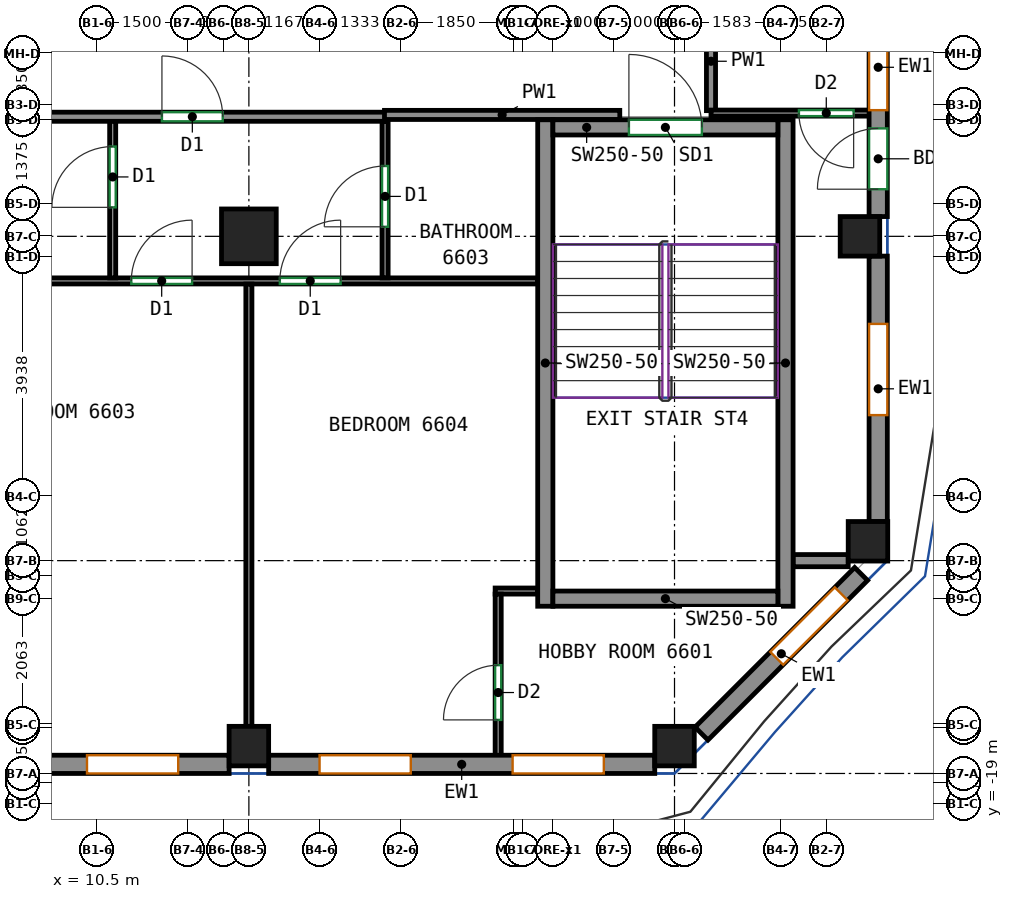
"""IFC4 building model, lengths in metres.
Left out: names, types, materials, properties, quantities, classifications, styles, units other than length and angle.
Written with IfcOpenShell. Run it as: python <this file> out.ifc"""

import sys

from ifc_helpers import new_model, si_unit, direction, frame, frame_2d, origin, origin_2d, place, context, subcontext, project, spatial, rectangle, extrude, source, transform, mapped, element, fill, save


model = new_model("IFC4")
c1 = context("Model", 3, precision=1e-05, world=origin(), true_north=direction((0.0, 1.0)))
c2 = subcontext(c1, "Body", "Model", "MODEL_VIEW")
j1 = project(units=[si_unit("LENGTHUNIT", "METRE"), si_unit("PLANEANGLEUNIT", "RADIAN")], contexts=[c1])
p1 = place(None, origin())
s1 = spatial("IfcSite", under=j1, at=p1, CompositionType="ELEMENT")
p2 = place(p1, origin())
s2 = spatial("IfcBuilding", under=s1, at=p2, CompositionType="ELEMENT")
p3 = place(p2, frame((0.0, 0.0, 270.4)))
s3 = spatial("IfcBuildingStorey", under=s2, at=p3, CompositionType="ELEMENT", Elevation=270.4)
m1 = source(origin(), c2, "Body", "SweptSolid", [
    extrude(rectangle(XDim=0.65, YDim=0.65, at=origin_2d()), origin(), (0.0, 0.0, 1.0), 3.12),
])
p4 = place(p3, frame((13.0, -18.05, 0.0), z_axis=(0.0, 0.0, 1.0), x_axis=(1.0, 0.0, 0.0)))
e1 = element("IfcColumn", 1, at=p4, inside=s3, PredefinedType="COLUMN", context=c2, shape_type="MappedRepresentation", body=[
    mapped(m1, transform((0.0, 0.0, 0.0))),
])
m2 = source(origin(), c2, "Body", "SweptSolid", [
    extrude(rectangle(XDim=0.9, YDim=0.9, at=origin_2d()), origin(), (0.0, 0.0, 1.0), 3.12),
])
p5 = place(p3, frame((13.0, -9.667, 0.0), z_axis=(0.0, 0.0, 1.0), x_axis=(1.0, 0.0, 0.0)))
e2 = element("IfcColumn", 2, at=p5, inside=s3, PredefinedType="COLUMN", context=c2, shape_type="MappedRepresentation", body=[
    mapped(m2, transform((0.0, 0.0, 0.0))),
])
for number, where, z_axis, x_axis in (
    (3, (20.0, -18.05, 0.0), (0.0, 0.0, 1.0), (1.0, 0.0, 0.0)),
    (4, (23.05, -9.667, 0.0), (0.0, 0.0, 1.0), (1.0, 0.0, 0.0)),
    (5, (23.182, -14.682, 0.0), (0.0, 0.0, 1.0), (1.0, 0.0, 0.0)),
):
    element("IfcColumn", number, at=place(p3, frame(where, z_axis=z_axis, x_axis=x_axis)), inside=s3, PredefinedType="COLUMN", context=c2, shape_type="MappedRepresentation", body=[
        mapped(m1, transform((0.0, 0.0, 0.0))),
    ])
m3 = source(origin(), c2, "Body", "SweptSolid", [
    extrude(rectangle(XDim=8.0, YDim=0.25, at=frame_2d((4.0, 0.0))), origin(), (0.0, 0.0, 1.0), 3.12),
])
for number, where, z_axis, x_axis in (
    (6, (17.875, -15.75, 0.0), (0.0, 0.0, 1.0), (0.0, 1.0, 0.0)),
    (7, (21.825, -15.75, 0.0), (0.0, 0.0, 1.0), (0.0, 1.0, 0.0)),
):
    element("IfcWall", number, at=place(p3, frame(where, z_axis=z_axis, x_axis=x_axis)), inside=s3, PredefinedType="SHEAR", context=c2, shape_type="MappedRepresentation", body=[
        mapped(m3, transform((0.0, 0.0, 0.0))),
    ])
m4 = source(origin(), c2, "Body", "SweptSolid", [
    extrude(rectangle(XDim=3.7, YDim=0.25, at=frame_2d((1.85, 0.0))), origin(), (0.0, 0.0, 1.0), 3.12),
])
p6 = place(p3, frame((18.0, -15.625, 0.0), z_axis=(0.0, 0.0, 1.0), x_axis=(1.0, 0.0, 0.0)))
e8 = element("IfcWall", 8, at=p6, inside=s3, PredefinedType="SHEAR", context=c2, shape_type="MappedRepresentation", body=[
    mapped(m4, transform((0.0, 0.0, 0.0))),
])
p7 = place(p3, frame((18.0, -7.875, 0.0), z_axis=(0.0, 0.0, 1.0), x_axis=(1.0, 0.0, 0.0)))
e9 = element("IfcWall", 9, at=p7, inside=s3, PredefinedType="SHEAR", context=c2, shape_type="MappedRepresentation", body=[
    mapped(m4, transform((0.0, 0.0, 0.0))),
])
p8 = place(p7, frame((1.25, 0.0, 0.0)))
e10 = element("IfcOpeningElement", 10, at=p8, cuts=e9, PredefinedType="OPENING", context=c2, shape_type="SweptSolid", body=[
    extrude(rectangle(XDim=1.2, YDim=2.1, at=frame_2d((0.6, 1.05))), frame((0.0, 0.135, 0.0), z_axis=(0.0, -1.0, 0.0), x_axis=(1.0, 0.0, 0.0)), (0.0, 0.0, 1.0), 0.27),
])
m5 = source(origin(), c2, "Body", "SweptSolid", [
    extrude(rectangle(XDim=6.35, YDim=0.3, at=frame_2d((3.175, 0.0))), origin(), (0.0, 0.0, 1.0), 3.12),
])
p9 = place(p3, frame((6.325, -18.35, 0.0), z_axis=(0.0, 0.0, 1.0), x_axis=(1.0, 0.0, 0.0)))
e11 = element("IfcWall", 11, at=p9, inside=s3, PredefinedType="SOLIDWALL", context=c2, shape_type="MappedRepresentation", body=[
    mapped(m5, transform((0.0, 0.0, 0.0))),
])
p10 = place(p9, frame((0.837, 0.0, 0.8)))
e12 = element("IfcOpeningElement", 12, at=p10, cuts=e11, PredefinedType="OPENING", context=c2, shape_type="SweptSolid", body=[
    extrude(rectangle(XDim=1.5, YDim=2.05, at=frame_2d((0.75, 1.025))), frame((0.0, 0.16, 0.0), z_axis=(0.0, -1.0, 0.0), x_axis=(1.0, 0.0, 0.0)), (0.0, 0.0, 1.0), 0.32),
])
p11 = place(p9, frame((4.012, 0.0, 0.8)))
e13 = element("IfcOpeningElement", 13, at=p11, cuts=e11, PredefinedType="OPENING", context=c2, shape_type="SweptSolid", body=[
    extrude(rectangle(XDim=1.5, YDim=2.05, at=frame_2d((0.75, 1.025))), frame((0.0, 0.16, 0.0), z_axis=(0.0, -1.0, 0.0), x_axis=(1.0, 0.0, 0.0)), (0.0, 0.0, 1.0), 0.32),
])
p12 = place(p3, frame((13.325, -18.35, 0.0), z_axis=(0.0, 0.0, 1.0), x_axis=(1.0, 0.0, 0.0)))
e14 = element("IfcWall", 14, at=p12, inside=s3, PredefinedType="SOLIDWALL", context=c2, shape_type="MappedRepresentation", body=[
    mapped(m5, transform((0.0, 0.0, 0.0))),
])
p13 = place(p12, frame((0.837, 0.0, 0.8)))
e15 = element("IfcOpeningElement", 15, at=p13, cuts=e14, PredefinedType="OPENING", context=c2, shape_type="SweptSolid", body=[
    extrude(rectangle(XDim=1.5, YDim=2.05, at=frame_2d((0.75, 1.025))), frame((0.0, 0.16, 0.0), z_axis=(0.0, -1.0, 0.0), x_axis=(1.0, 0.0, 0.0)), (0.0, 0.0, 1.0), 0.32),
])
p14 = place(p12, frame((4.012, 0.0, 0.8)))
e16 = element("IfcOpeningElement", 16, at=p14, cuts=e14, PredefinedType="OPENING", context=c2, shape_type="SweptSolid", body=[
    extrude(rectangle(XDim=1.5, YDim=2.05, at=frame_2d((0.75, 1.025))), frame((0.0, 0.16, 0.0), z_axis=(0.0, -1.0, 0.0), x_axis=(1.0, 0.0, 0.0)), (0.0, 0.0, 1.0), 0.32),
])
m6 = source(origin(), c2, "Body", "SweptSolid", [
    extrude(rectangle(XDim=3.712, YDim=0.3, at=frame_2d((1.856, 0.0))), origin(), (0.0, 0.0, 1.0), 3.12),
])
p15 = place(p3, frame((20.444, -17.844, 0.0), z_axis=(0.0, 0.0, 1.0), x_axis=(0.707106781187, 0.707106781187, 0.0)))
e17 = element("IfcWall", 17, at=p15, inside=s3, PredefinedType="SOLIDWALL", context=c2, shape_type="MappedRepresentation", body=[
    mapped(m6, transform((0.0, 0.0, 0.0))),
])
p16 = place(p15, frame((1.75, 0.0, 0.8)))
e18 = element("IfcOpeningElement", 18, at=p16, cuts=e17, PredefinedType="OPENING", context=c2, shape_type="SweptSolid", body=[
    extrude(rectangle(XDim=1.5, YDim=2.05, at=frame_2d((0.75, 1.025))), frame((0.0, 0.16, 0.0), z_axis=(0.0, -1.0, 0.0), x_axis=(1.0, 0.0, 0.0)), (0.0, 0.0, 1.0), 0.32),
])
m7 = source(origin(), c2, "Body", "SweptSolid", [
    extrude(rectangle(XDim=4.365, YDim=0.3, at=frame_2d((2.183, 0.0))), origin(), (0.0, 0.0, 1.0), 3.12),
])
p17 = place(p3, frame((23.35, -14.357, 0.0), z_axis=(0.0, 0.0, 1.0), x_axis=(0.0, 1.0, 0.0)))
e19 = element("IfcWall", 19, at=p17, inside=s3, PredefinedType="SOLIDWALL", context=c2, shape_type="MappedRepresentation", body=[
    mapped(m7, transform((0.0, 0.0, 0.0))),
])
p18 = place(p17, frame((1.75, 0.0, 0.8)))
e20 = element("IfcOpeningElement", 20, at=p18, cuts=e19, PredefinedType="OPENING", context=c2, shape_type="SweptSolid", body=[
    extrude(rectangle(XDim=1.5, YDim=2.05, at=frame_2d((0.75, 1.025))), frame((0.0, 0.16, 0.0), z_axis=(0.0, -1.0, 0.0), x_axis=(1.0, 0.0, 0.0)), (0.0, 0.0, 1.0), 0.32),
])
m8 = source(origin(), c2, "Body", "SweptSolid", [
    extrude(rectangle(XDim=8.184, YDim=0.3, at=frame_2d((4.092, 0.0))), origin(), (0.0, 0.0, 1.0), 3.12),
])
p19 = place(p3, frame((23.35, -9.342, 0.0), z_axis=(0.0, 0.0, 1.0), x_axis=(0.0, 1.0, 0.0)))
e21 = element("IfcWall", 21, at=p19, inside=s3, PredefinedType="SOLIDWALL", context=c2, shape_type="MappedRepresentation", body=[
    mapped(m8, transform((0.0, 0.0, 0.0))),
])
p20 = place(p19, frame((1.75, 0.0, 0.8)))
e22 = element("IfcOpeningElement", 22, at=p20, cuts=e21, PredefinedType="OPENING", context=c2, shape_type="SweptSolid", body=[
    extrude(rectangle(XDim=1.5, YDim=2.05, at=frame_2d((0.75, 1.025))), frame((0.0, 0.16, 0.0), z_axis=(0.0, -1.0, 0.0), x_axis=(1.0, 0.0, 0.0)), (0.0, 0.0, 1.0), 0.32),
])
p21 = place(p19, frame((0.45, 0.0, 0.0)))
e23 = element("IfcOpeningElement", 23, at=p21, cuts=e21, PredefinedType="OPENING", context=c2, shape_type="SweptSolid", body=[
    extrude(rectangle(XDim=1.0, YDim=2.1, at=frame_2d((0.5, 1.05))), frame((0.0, 0.16, 0.0), z_axis=(0.0, -1.0, 0.0), x_axis=(1.0, 0.0, 0.0)), (0.0, 0.0, 1.0), 0.32),
])
p22 = place(p19, frame((5.842, 0.0, 0.8)))
e24 = element("IfcOpeningElement", 24, at=p22, cuts=e21, PredefinedType="OPENING", context=c2, shape_type="SweptSolid", body=[
    extrude(rectangle(XDim=1.5, YDim=2.05, at=frame_2d((0.75, 1.025))), frame((0.0, 0.16, 0.0), z_axis=(0.0, -1.0, 0.0), x_axis=(1.0, 0.0, 0.0)), (0.0, 0.0, 1.0), 0.32),
])
p23 = place(p19, frame((4.542, 0.0, 0.0)))
e25 = element("IfcOpeningElement", 25, at=p23, cuts=e21, PredefinedType="OPENING", context=c2, shape_type="SweptSolid", body=[
    extrude(rectangle(XDim=1.0, YDim=2.1, at=frame_2d((0.5, 1.05))), frame((0.0, 0.16, 0.0), z_axis=(0.0, -1.0, 0.0), x_axis=(1.0, 0.0, 0.0)), (0.0, 0.0, 1.0), 0.32),
])
p24 = place(p3, frame((-4.51, -7.7, 0.0), z_axis=(0.0, 0.0, 1.0), x_axis=(1.0, 0.0, 0.0)))
e26 = element("IfcWall", 26, at=p24, inside=s3, PredefinedType="PARTITIONING", context=c2, shape_type="SweptSolid", body=[
    extrude(rectangle(XDim=19.76, YDim=0.15, at=frame_2d((9.88, 0.0))), origin(), (0.0, 0.0, 1.0), 3.12),
])
p25 = place(p24, frame((3.566, 0.0, 0.0)))
e27 = element("IfcOpeningElement", 27, at=p25, cuts=e26, PredefinedType="OPENING", context=c2, shape_type="SweptSolid", body=[
    extrude(rectangle(XDim=1.0, YDim=2.1, at=frame_2d((0.5, 1.05))), frame((0.0, 0.085, 0.0), z_axis=(0.0, -1.0, 0.0), x_axis=(1.0, 0.0, 0.0)), (0.0, 0.0, 1.0), 0.17),
])
p26 = place(p24, frame((16.08, 0.0, 0.0)))
e28 = element("IfcOpeningElement", 28, at=p26, cuts=e26, PredefinedType="OPENING", context=c2, shape_type="SweptSolid", body=[
    extrude(rectangle(XDim=1.0, YDim=2.1, at=frame_2d((0.5, 1.05))), frame((0.0, 0.085, 0.0), z_axis=(0.0, -1.0, 0.0), x_axis=(1.0, 0.0, 0.0)), (0.0, 0.0, 1.0), 0.17),
])
p27 = place(p3, frame((15.23, -7.67, 0.0), z_axis=(0.0, 0.0, 1.0), x_axis=(1.0, 0.0, 0.0)))
e29 = element("IfcWall", 29, at=p27, inside=s3, PredefinedType="PARTITIONING", context=c2, shape_type="SweptSolid", body=[
    extrude(rectangle(XDim=3.87, YDim=0.15, at=frame_2d((1.935, 0.0))), origin(), (0.0, 0.0, 1.0), 3.12),
])
p28 = place(p3, frame((20.6, -7.6, 0.0), z_axis=(0.0, 0.0, 1.0), x_axis=(0.0, 1.0, 0.0)))
e30 = element("IfcWall", 30, at=p28, inside=s3, PredefinedType="PARTITIONING", context=c2, shape_type="SweptSolid", body=[
    extrude(rectangle(XDim=1.625, YDim=0.15, at=frame_2d((0.812, 0.0))), origin(), (0.0, 0.0, 1.0), 3.12),
])
p29 = place(p3, frame((-4.6, -10.4, 0.0), z_axis=(0.0, 0.0, 1.0), x_axis=(1.0, 0.0, 0.0)))
e31 = element("IfcWall", 31, at=p29, inside=s3, PredefinedType="PARTITIONING", context=c2, shape_type="SweptSolid", body=[
    extrude(rectangle(XDim=22.35, YDim=0.1, at=frame_2d((11.175, 0.0))), origin(), (0.0, 0.0, 1.0), 3.12),
])
p30 = place(p29, frame((3.96, 0.0, 0.0)))
e32 = element("IfcOpeningElement", 32, at=p30, cuts=e31, PredefinedType="OPENING", context=c2, shape_type="SweptSolid", body=[
    extrude(rectangle(XDim=1.0, YDim=2.1, at=frame_2d((0.5, 1.05))), frame((0.0, 0.06, 0.0), z_axis=(0.0, -1.0, 0.0), x_axis=(1.0, 0.0, 0.0)), (0.0, 0.0, 1.0), 0.12),
])
p31 = place(p29, frame((15.666, 0.0, 0.0)))
e33 = element("IfcOpeningElement", 33, at=p31, cuts=e31, PredefinedType="OPENING", context=c2, shape_type="SweptSolid", body=[
    extrude(rectangle(XDim=1.0, YDim=2.1, at=frame_2d((0.5, 1.05))), frame((0.0, 0.06, 0.0), z_axis=(0.0, -1.0, 0.0), x_axis=(1.0, 0.0, 0.0)), (0.0, 0.0, 1.0), 0.12),
])
p32 = place(p29, frame((18.109, 0.0, 0.0)))
e34 = element("IfcOpeningElement", 34, at=p32, cuts=e31, PredefinedType="OPENING", context=c2, shape_type="SweptSolid", body=[
    extrude(rectangle(XDim=1.0, YDim=2.1, at=frame_2d((0.5, 1.05))), frame((0.0, 0.06, 0.0), z_axis=(0.0, -1.0, 0.0), x_axis=(1.0, 0.0, 0.0)), (0.0, 0.0, 1.0), 0.12),
])
p33 = place(p3, frame((10.76, -10.35, 0.0), z_axis=(0.0, 0.0, 1.0), x_axis=(0.0, 1.0, 0.0)))
e35 = element("IfcWall", 35, at=p33, inside=s3, PredefinedType="PARTITIONING", context=c2, shape_type="SweptSolid", body=[
    extrude(rectangle(XDim=2.573, YDim=0.1, at=frame_2d((1.287, 0.0))), origin(), (0.0, 0.0, 1.0), 3.12),
])
p34 = place(p33, frame((1.16, 0.0, 0.0)))
e36 = element("IfcOpeningElement", 36, at=p34, cuts=e35, PredefinedType="OPENING", context=c2, shape_type="SweptSolid", body=[
    extrude(rectangle(XDim=1.0, YDim=2.1, at=frame_2d((0.5, 1.05))), frame((0.0, 0.06, 0.0), z_axis=(0.0, -1.0, 0.0), x_axis=(1.0, 0.0, 0.0)), (0.0, 0.0, 1.0), 0.12),
])
p35 = place(p3, frame((15.24, -10.35, 0.0), z_axis=(0.0, 0.0, 1.0), x_axis=(0.0, 1.0, 0.0)))
e37 = element("IfcWall", 37, at=p35, inside=s3, PredefinedType="PARTITIONING", context=c2, shape_type="SweptSolid", body=[
    extrude(rectangle(XDim=2.573, YDim=0.1, at=frame_2d((1.287, 0.0))), origin(), (0.0, 0.0, 1.0), 3.12),
])
p36 = place(p35, frame((0.84, 0.0, 0.0)))
e38 = element("IfcOpeningElement", 38, at=p36, cuts=e37, PredefinedType="OPENING", context=c2, shape_type="SweptSolid", body=[
    extrude(rectangle(XDim=1.0, YDim=2.1, at=frame_2d((0.5, 1.05))), frame((0.0, 0.06, 0.0), z_axis=(0.0, -1.0, 0.0), x_axis=(1.0, 0.0, 0.0)), (0.0, 0.0, 1.0), 0.12),
])
p37 = place(p3, frame((13.0, -17.725, 0.0), z_axis=(0.0, 0.0, 1.0), x_axis=(0.0, 1.0, 0.0)))
e39 = element("IfcWall", 39, at=p37, inside=s3, PredefinedType="PARTITIONING", context=c2, shape_type="SweptSolid", body=[
    extrude(rectangle(XDim=7.273, YDim=0.1, at=frame_2d((3.637, 0.0))), origin(), (0.0, 0.0, 1.0), 3.12),
])
p38 = place(p3, frame((17.05, -15.5, 0.0), z_axis=(0.0, 0.0, 1.0), x_axis=(1.0, 0.0, 0.0)))
e40 = element("IfcWall", 40, at=p38, inside=s3, PredefinedType="PARTITIONING", context=c2, shape_type="SweptSolid", body=[
    extrude(rectangle(XDim=0.7, YDim=0.1, at=frame_2d((0.35, 0.0))), origin(), (0.0, 0.0, 1.0), 3.12),
])
p39 = place(p3, frame((17.1, -18.25, 0.0), z_axis=(0.0, 0.0, 1.0), x_axis=(0.0, 1.0, 0.0)))
e41 = element("IfcWall", 41, at=p39, inside=s3, PredefinedType="PARTITIONING", context=c2, shape_type="SweptSolid", body=[
    extrude(rectangle(XDim=2.7, YDim=0.1, at=frame_2d((1.35, 0.0))), origin(), (0.0, 0.0, 1.0), 3.12),
])
p40 = place(p39, frame((0.631, 0.0, 0.0)))
e42 = element("IfcOpeningElement", 42, at=p40, cuts=e41, PredefinedType="OPENING", context=c2, shape_type="SweptSolid", body=[
    extrude(rectangle(XDim=0.9, YDim=2.1, at=frame_2d((0.45, 1.05))), frame((0.0, 0.06, 0.0), z_axis=(0.0, -1.0, 0.0), x_axis=(1.0, 0.0, 0.0)), (0.0, 0.0, 1.0), 0.12),
])
p41 = place(p3, frame((21.95, -15.0, 0.0), z_axis=(0.0, 0.0, 1.0), x_axis=(1.0, 0.0, 0.0)))
e43 = element("IfcWall", 43, at=p41, inside=s3, PredefinedType="PARTITIONING", context=c2, shape_type="SweptSolid", body=[
    extrude(rectangle(XDim=0.907, YDim=0.2, at=frame_2d((0.454, 0.0))), origin(), (0.0, 0.0, 1.0), 3.12),
])
p42 = place(p3, frame((23.25, -7.64, 0.0), z_axis=(0.0, 0.0, 1.0), x_axis=(-1.0, 0.0, 0.0)))
e44 = element("IfcWall", 44, at=p42, inside=s3, PredefinedType="PARTITIONING", context=c2, shape_type="SweptSolid", body=[
    extrude(rectangle(XDim=2.65, YDim=0.1, at=frame_2d((1.325, 0.0))), origin(), (0.0, 0.0, 1.0), 3.12),
])
p43 = place(p42, frame((0.304, 0.0, 0.0)))
e45 = element("IfcOpeningElement", 45, at=p43, cuts=e44, PredefinedType="OPENING", context=c2, shape_type="SweptSolid", body=[
    extrude(rectangle(XDim=0.9, YDim=2.1, at=frame_2d((0.45, 1.05))), frame((0.0, 0.06, 0.0), z_axis=(0.0, -1.0, 0.0), x_axis=(1.0, 0.0, 0.0)), (0.0, 0.0, 1.0), 0.12),
])
p44 = place(p11, origin())
e46 = element("IfcWindow", 46, at=p44, inside=s3, PartitioningType="SINGLE_PANEL", PredefinedType="WINDOW", context=c2, shape_type="SweptSolid", body=[
    extrude(rectangle(XDim=1.5, YDim=2.05, at=frame_2d((0.75, 1.025))), frame((0.0, 0.03, 0.0), z_axis=(0.0, -1.0, 0.0), x_axis=(1.0, 0.0, 0.0)), (0.0, 0.0, 1.0), 0.06),
])
fill(e13, e46)
p45 = place(p13, origin())
e47 = element("IfcWindow", 47, at=p45, inside=s3, PartitioningType="SINGLE_PANEL", PredefinedType="WINDOW", context=c2, shape_type="SweptSolid", body=[
    extrude(rectangle(XDim=1.5, YDim=2.05, at=frame_2d((0.75, 1.025))), frame((0.0, 0.03, 0.0), z_axis=(0.0, -1.0, 0.0), x_axis=(1.0, 0.0, 0.0)), (0.0, 0.0, 1.0), 0.06),
])
fill(e15, e47)
p46 = place(p14, origin())
e48 = element("IfcWindow", 48, at=p46, inside=s3, PartitioningType="SINGLE_PANEL", PredefinedType="WINDOW", context=c2, shape_type="SweptSolid", body=[
    extrude(rectangle(XDim=1.5, YDim=2.05, at=frame_2d((0.75, 1.025))), frame((0.0, 0.03, 0.0), z_axis=(0.0, -1.0, 0.0), x_axis=(1.0, 0.0, 0.0)), (0.0, 0.0, 1.0), 0.06),
])
fill(e16, e48)
p47 = place(p16, origin())
e49 = element("IfcWindow", 49, at=p47, inside=s3, PartitioningType="SINGLE_PANEL", PredefinedType="WINDOW", context=c2, shape_type="SweptSolid", body=[
    extrude(rectangle(XDim=1.5, YDim=2.05, at=frame_2d((0.75, 1.025))), frame((0.0, 0.03, 0.0), z_axis=(0.0, -1.0, 0.0), x_axis=(1.0, 0.0, 0.0)), (0.0, 0.0, 1.0), 0.06),
])
fill(e18, e49)
p48 = place(p18, origin())
e50 = element("IfcWindow", 50, at=p48, inside=s3, PartitioningType="SINGLE_PANEL", PredefinedType="WINDOW", context=c2, shape_type="SweptSolid", body=[
    extrude(rectangle(XDim=1.5, YDim=2.05, at=frame_2d((0.75, 1.025))), frame((0.0, 0.03, 0.0), z_axis=(0.0, -1.0, 0.0), x_axis=(1.0, 0.0, 0.0)), (0.0, 0.0, 1.0), 0.06),
])
fill(e20, e50)
p49 = place(p20, origin())
e51 = element("IfcWindow", 51, at=p49, inside=s3, PartitioningType="SINGLE_PANEL", PredefinedType="WINDOW", context=c2, shape_type="SweptSolid", body=[
    extrude(rectangle(XDim=1.5, YDim=2.05, at=frame_2d((0.75, 1.025))), frame((0.0, 0.03, 0.0), z_axis=(0.0, -1.0, 0.0), x_axis=(1.0, 0.0, 0.0)), (0.0, 0.0, 1.0), 0.06),
])
fill(e22, e51)
p50 = place(p21, origin())
e52 = element("IfcDoor", 52, at=p50, inside=s3, OperationType="SINGLE_SWING_LEFT", PredefinedType="DOOR", context=c2, shape_type="SweptSolid", body=[
    extrude(rectangle(XDim=1.0, YDim=2.1, at=frame_2d((0.5, 1.05))), frame((0.0, 0.025, 0.0), z_axis=(0.0, -1.0, 0.0), x_axis=(1.0, 0.0, 0.0)), (0.0, 0.0, 1.0), 0.05),
])
fill(e23, e52)
p51 = place(p8, origin())
e53 = element("IfcDoor", 53, at=p51, inside=s3, OperationType="DOUBLE_DOOR_SINGLE_SWING", PredefinedType="DOOR", context=c2, shape_type="SweptSolid", body=[
    extrude(rectangle(XDim=1.2, YDim=2.1, at=frame_2d((0.6, 1.05))), frame((0.0, 0.025, 0.0), z_axis=(0.0, -1.0, 0.0), x_axis=(1.0, 0.0, 0.0)), (0.0, 0.0, 1.0), 0.05),
])
fill(e10, e53)
p52 = place(p40, origin())
e54 = element("IfcDoor", 54, at=p52, inside=s3, OperationType="SINGLE_SWING_LEFT", PredefinedType="DOOR", context=c2, shape_type="SweptSolid", body=[
    extrude(rectangle(XDim=0.9, YDim=2.1, at=frame_2d((0.45, 1.05))), frame((0.0, 0.025, 0.0), z_axis=(0.0, -1.0, 0.0), x_axis=(1.0, 0.0, 0.0)), (0.0, 0.0, 1.0), 0.05),
])
fill(e42, e54)
p53 = place(p31, origin())
e55 = element("IfcDoor", 55, at=p53, inside=s3, OperationType="SINGLE_SWING_RIGHT", PredefinedType="DOOR", context=c2, shape_type="SweptSolid", body=[
    extrude(rectangle(XDim=1.0, YDim=2.1, at=frame_2d((0.5, 1.05))), frame((0.0, 0.025, 0.0), z_axis=(0.0, -1.0, 0.0), x_axis=(1.0, 0.0, 0.0)), (0.0, 0.0, 1.0), 0.05),
])
fill(e33, e55)
p54 = place(p32, origin())
e56 = element("IfcDoor", 56, at=p54, inside=s3, OperationType="SINGLE_SWING_RIGHT", PredefinedType="DOOR", context=c2, shape_type="SweptSolid", body=[
    extrude(rectangle(XDim=1.0, YDim=2.1, at=frame_2d((0.5, 1.05))), frame((0.0, 0.025, 0.0), z_axis=(0.0, -1.0, 0.0), x_axis=(1.0, 0.0, 0.0)), (0.0, 0.0, 1.0), 0.05),
])
fill(e34, e56)
p55 = place(p36, origin())
e57 = element("IfcDoor", 57, at=p55, inside=s3, OperationType="SINGLE_SWING_LEFT", PredefinedType="DOOR", context=c2, shape_type="SweptSolid", body=[
    extrude(rectangle(XDim=1.0, YDim=2.1, at=frame_2d((0.5, 1.05))), frame((0.0, 0.025, 0.0), z_axis=(0.0, -1.0, 0.0), x_axis=(1.0, 0.0, 0.0)), (0.0, 0.0, 1.0), 0.05),
])
fill(e38, e57)
p56 = place(p34, origin())
e58 = element("IfcDoor", 58, at=p56, inside=s3, OperationType="SINGLE_SWING_LEFT", PredefinedType="DOOR", context=c2, shape_type="SweptSolid", body=[
    extrude(rectangle(XDim=1.0, YDim=2.1, at=frame_2d((0.5, 1.05))), frame((0.0, 0.025, 0.0), z_axis=(0.0, -1.0, 0.0), x_axis=(1.0, 0.0, 0.0)), (0.0, 0.0, 1.0), 0.05),
])
fill(e36, e58)
p57 = place(p26, origin())
e59 = element("IfcDoor", 59, at=p57, inside=s3, OperationType="SINGLE_SWING_LEFT", PredefinedType="DOOR", context=c2, shape_type="SweptSolid", body=[
    extrude(rectangle(XDim=1.0, YDim=2.1, at=frame_2d((0.5, 1.05))), frame((0.0, 0.025, 0.0), z_axis=(0.0, -1.0, 0.0), x_axis=(1.0, 0.0, 0.0)), (0.0, 0.0, 1.0), 0.05),
])
fill(e28, e59)
p58 = place(p43, origin())
e60 = element("IfcDoor", 60, at=p58, inside=s3, OperationType="SINGLE_SWING_LEFT", PredefinedType="DOOR", context=c2, shape_type="SweptSolid", body=[
    extrude(rectangle(XDim=0.9, YDim=2.1, at=frame_2d((0.45, 1.05))), frame((0.0, 0.025, 0.0), z_axis=(0.0, -1.0, 0.0), x_axis=(1.0, 0.0, 0.0)), (0.0, 0.0, 1.0), 0.05),
])
fill(e45, e60)
save(model, sys.argv[1])
